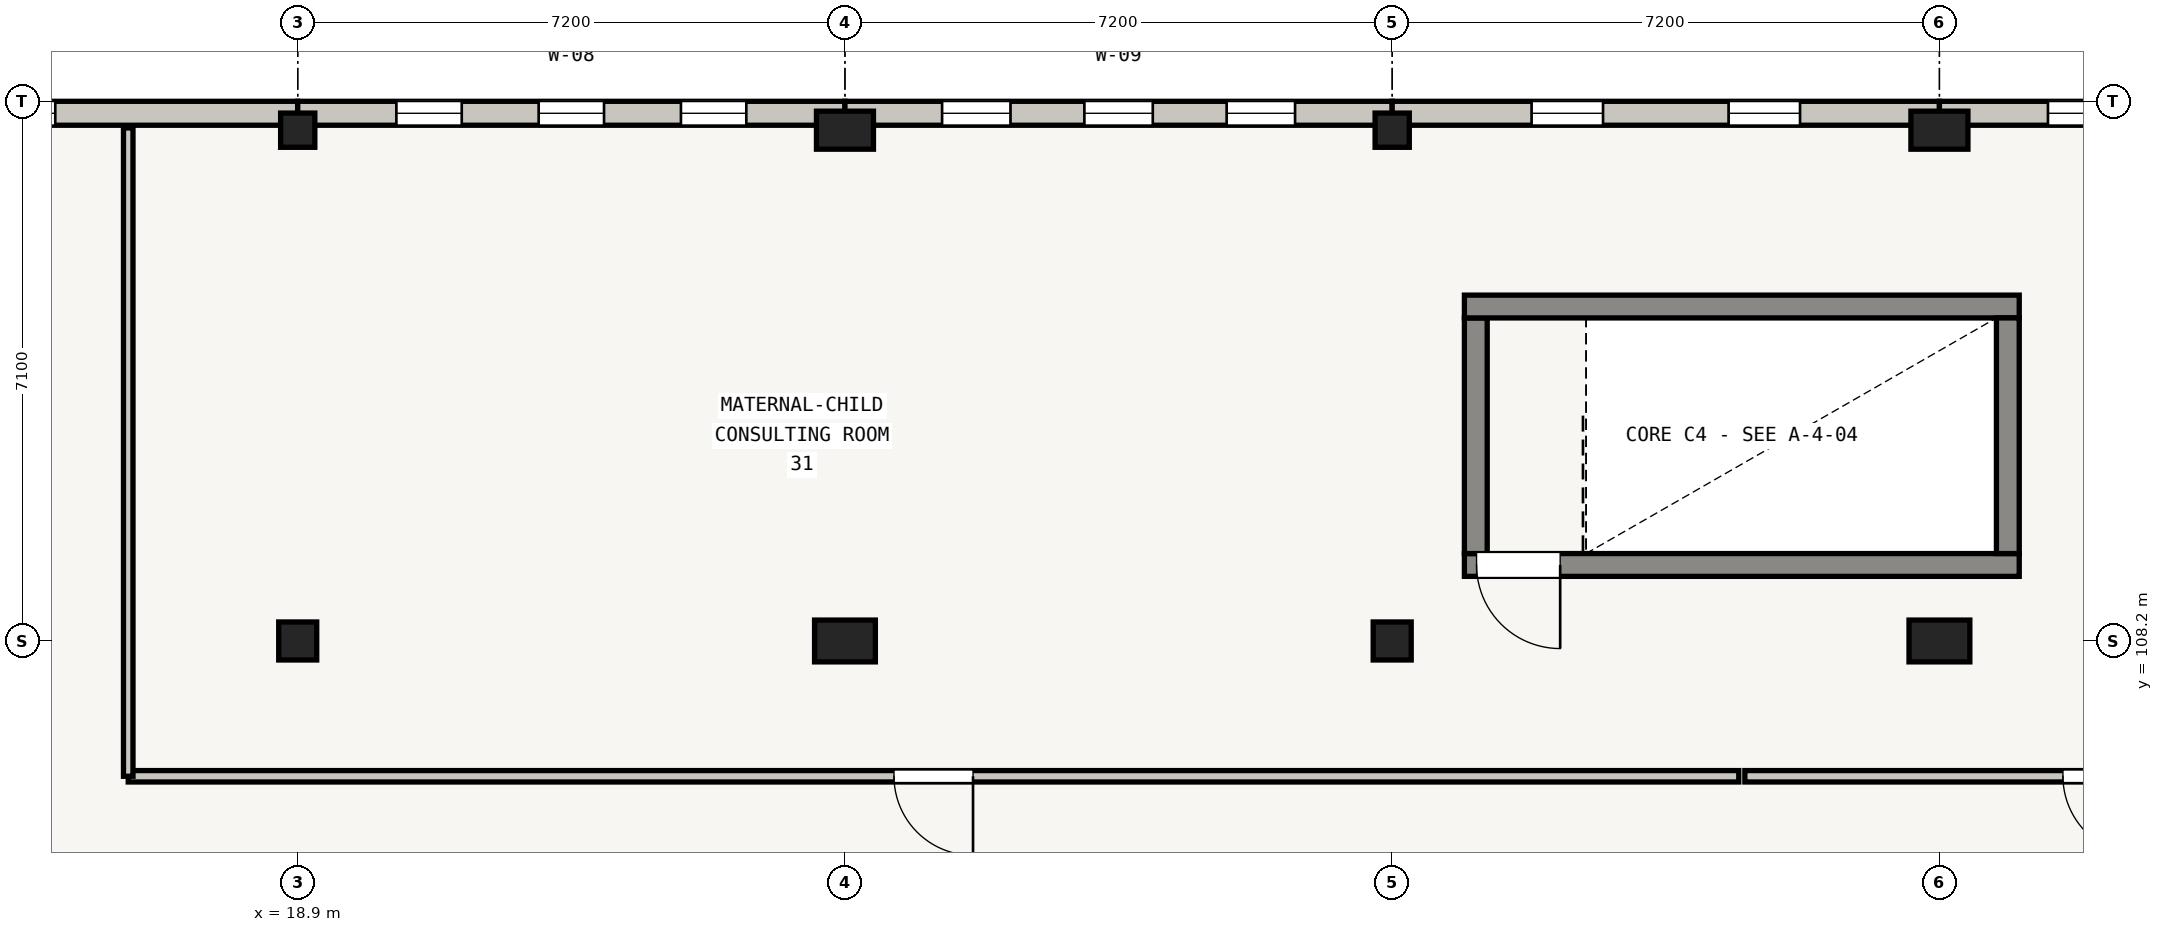
"""IFC4 building model, lengths in metres.
Left out: names, types, materials, properties, quantities, classifications, styles, units other than length and angle.
Written with IfcOpenShell. Run it as: python <this file> out.ifc"""

import sys

from ifc_helpers import new_model, si_unit, direction, frame, frame_2d, origin, origin_2d, place, context, subcontext, project, spatial, rectangle, extrude, element, fill, save


model = new_model("IFC4")
c1 = context("Model", 3, precision=1e-05, world=origin(), true_north=direction((0.0, 1.0)))
c2 = subcontext(c1, "Body", "Model", "MODEL_VIEW")
j1 = project(units=[si_unit("LENGTHUNIT", "METRE"), si_unit("PLANEANGLEUNIT", "RADIAN")], contexts=[c1])
p1 = place(None, origin())
s1 = spatial("IfcSite", under=j1, at=p1, CompositionType="ELEMENT")
p2 = place(p1, origin())
s2 = spatial("IfcBuilding", under=s1, at=p2, CompositionType="ELEMENT")
p3 = place(p2, frame((0.0, 0.0, 12.9)))
s3 = spatial("IfcBuildingStorey", under=s2, at=p3, CompositionType="ELEMENT", Elevation=12.9)
p4 = place(p3, frame((18.9, 108.2, 0.0), z_axis=(0.0, 0.0, 1.0), x_axis=(1.0, 0.0, 0.0)))
e1 = element("IfcColumn", 1, at=p4, inside=s3, PredefinedType="COLUMN", context=c2, shape_type="SweptSolid", body=[
    extrude(rectangle(XDim=0.5, YDim=0.5, at=origin_2d()), origin(), (0.0, 0.0, 1.0), 4.025),
])
p5 = place(p3, frame((18.9, 114.92, 0.0), z_axis=(0.0, 0.0, 1.0), x_axis=(1.0, 0.0, 0.0)))
e2 = element("IfcColumn", 2, at=p5, inside=s3, PredefinedType="COLUMN", context=c2, shape_type="SweptSolid", body=[
    extrude(rectangle(XDim=0.45, YDim=0.45, at=origin_2d()), origin(), (0.0, 0.0, 1.0), 4.025),
])
p6 = place(p3, frame((26.1, 108.2, 0.0), z_axis=(0.0, 0.0, 1.0), x_axis=(1.0, 0.0, 0.0)))
e3 = element("IfcColumn", 3, at=p6, inside=s3, PredefinedType="COLUMN", context=c2, shape_type="SweptSolid", body=[
    extrude(rectangle(XDim=0.8, YDim=0.55, at=origin_2d()), origin(), (0.0, 0.0, 1.0), 4.025),
])
p7 = place(p3, frame((26.1, 114.92, 0.0), z_axis=(0.0, 0.0, 1.0), x_axis=(1.0, 0.0, 0.0)))
e4 = element("IfcColumn", 4, at=p7, inside=s3, PredefinedType="COLUMN", context=c2, shape_type="SweptSolid", body=[
    extrude(rectangle(XDim=0.75, YDim=0.5, at=origin_2d()), origin(), (0.0, 0.0, 1.0), 4.025),
])
p8 = place(p3, frame((33.3, 108.2, 0.0), z_axis=(0.0, 0.0, 1.0), x_axis=(1.0, 0.0, 0.0)))
e5 = element("IfcColumn", 5, at=p8, inside=s3, PredefinedType="COLUMN", context=c2, shape_type="SweptSolid", body=[
    extrude(rectangle(XDim=0.5, YDim=0.5, at=origin_2d()), origin(), (0.0, 0.0, 1.0), 4.025),
])
p9 = place(p3, frame((33.3, 114.92, 0.0), z_axis=(0.0, 0.0, 1.0), x_axis=(1.0, 0.0, 0.0)))
e6 = element("IfcColumn", 6, at=p9, inside=s3, PredefinedType="COLUMN", context=c2, shape_type="SweptSolid", body=[
    extrude(rectangle(XDim=0.45, YDim=0.45, at=origin_2d()), origin(), (0.0, 0.0, 1.0), 4.025),
])
p10 = place(p3, frame((40.5, 108.2, 0.0), z_axis=(0.0, 0.0, 1.0), x_axis=(1.0, 0.0, 0.0)))
e7 = element("IfcColumn", 7, at=p10, inside=s3, PredefinedType="COLUMN", context=c2, shape_type="SweptSolid", body=[
    extrude(rectangle(XDim=0.8, YDim=0.55, at=origin_2d()), origin(), (0.0, 0.0, 1.0), 4.025),
])
p11 = place(p3, frame((40.5, 114.92, 0.0), z_axis=(0.0, 0.0, 1.0), x_axis=(1.0, 0.0, 0.0)))
e8 = element("IfcColumn", 8, at=p11, inside=s3, PredefinedType="COLUMN", context=c2, shape_type="SweptSolid", body=[
    extrude(rectangle(XDim=0.75, YDim=0.5, at=origin_2d()), origin(), (0.0, 0.0, 1.0), 4.025),
])
p12 = place(p3, frame((11.7, 115.143, 0.0), z_axis=(0.0, 0.0, 1.0), x_axis=(1.0, 0.0, 0.0)))
e9 = element("IfcWall", 9, at=p12, inside=s3, PredefinedType="SOLIDWALL", context=c2, shape_type="SweptSolid", body=[
    extrude(rectangle(XDim=7.2, YDim=0.315, at=frame_2d((3.6, 0.0))), origin(), (0.0, 0.0, 1.0), 4.015),
])
p13 = place(p12, frame((3.19, 0.0, 0.55)))
e10 = element("IfcOpeningElement", 10, at=p13, cuts=e9, PredefinedType="OPENING", context=c2, shape_type="SweptSolid", body=[
    extrude(rectangle(XDim=0.82, YDim=2.2, at=frame_2d((0.41, 1.1))), frame((0.0, 0.157, 0.0), z_axis=(0.0, -1.0, 0.0), x_axis=(1.0, 0.0, 0.0)), (0.0, 0.0, 1.0), 0.315),
])
p14 = place(p3, frame((18.9, 115.143, 0.0), z_axis=(0.0, 0.0, 1.0), x_axis=(1.0, 0.0, 0.0)))
e11 = element("IfcWall", 11, at=p14, inside=s3, PredefinedType="SOLIDWALL", context=c2, shape_type="SweptSolid", body=[
    extrude(rectangle(XDim=7.2, YDim=0.315, at=frame_2d((3.6, 0.0))), origin(), (0.0, 0.0, 1.0), 4.015),
])
p15 = place(p14, frame((1.298, 0.0, 0.55)))
e12 = element("IfcOpeningElement", 12, at=p15, cuts=e11, PredefinedType="OPENING", context=c2, shape_type="SweptSolid", body=[
    extrude(rectangle(XDim=0.86, YDim=2.2, at=frame_2d((0.43, 1.1))), frame((0.0, 0.157, 0.0), z_axis=(0.0, -1.0, 0.0), x_axis=(1.0, 0.0, 0.0)), (0.0, 0.0, 1.0), 0.315),
])
p16 = place(p14, frame((3.17, 0.0, 0.55)))
e13 = element("IfcOpeningElement", 13, at=p16, cuts=e11, PredefinedType="OPENING", context=c2, shape_type="SweptSolid", body=[
    extrude(rectangle(XDim=0.86, YDim=2.2, at=frame_2d((0.43, 1.1))), frame((0.0, 0.157, 0.0), z_axis=(0.0, -1.0, 0.0), x_axis=(1.0, 0.0, 0.0)), (0.0, 0.0, 1.0), 0.315),
])
p17 = place(p14, frame((5.042, 0.0, 0.55)))
e14 = element("IfcOpeningElement", 14, at=p17, cuts=e11, PredefinedType="OPENING", context=c2, shape_type="SweptSolid", body=[
    extrude(rectangle(XDim=0.86, YDim=2.2, at=frame_2d((0.43, 1.1))), frame((0.0, 0.157, 0.0), z_axis=(0.0, -1.0, 0.0), x_axis=(1.0, 0.0, 0.0)), (0.0, 0.0, 1.0), 0.315),
])
p18 = place(p3, frame((26.1, 115.143, 0.0), z_axis=(0.0, 0.0, 1.0), x_axis=(1.0, 0.0, 0.0)))
e15 = element("IfcWall", 15, at=p18, inside=s3, PredefinedType="SOLIDWALL", context=c2, shape_type="SweptSolid", body=[
    extrude(rectangle(XDim=7.2, YDim=0.315, at=frame_2d((3.6, 0.0))), origin(), (0.0, 0.0, 1.0), 4.015),
])
p19 = place(p18, frame((1.278, 0.0, 0.55)))
e16 = element("IfcOpeningElement", 16, at=p19, cuts=e15, PredefinedType="OPENING", context=c2, shape_type="SweptSolid", body=[
    extrude(rectangle(XDim=0.9, YDim=2.18, at=frame_2d((0.45, 1.09))), frame((0.0, 0.157, 0.0), z_axis=(0.0, -1.0, 0.0), x_axis=(1.0, 0.0, 0.0)), (0.0, 0.0, 1.0), 0.315),
])
p20 = place(p18, frame((3.15, 0.0, 0.55)))
e17 = element("IfcOpeningElement", 17, at=p20, cuts=e15, PredefinedType="OPENING", context=c2, shape_type="SweptSolid", body=[
    extrude(rectangle(XDim=0.9, YDim=2.18, at=frame_2d((0.45, 1.09))), frame((0.0, 0.157, 0.0), z_axis=(0.0, -1.0, 0.0), x_axis=(1.0, 0.0, 0.0)), (0.0, 0.0, 1.0), 0.315),
])
p21 = place(p18, frame((5.022, 0.0, 0.55)))
e18 = element("IfcOpeningElement", 18, at=p21, cuts=e15, PredefinedType="OPENING", context=c2, shape_type="SweptSolid", body=[
    extrude(rectangle(XDim=0.9, YDim=2.18, at=frame_2d((0.45, 1.09))), frame((0.0, 0.157, 0.0), z_axis=(0.0, -1.0, 0.0), x_axis=(1.0, 0.0, 0.0)), (0.0, 0.0, 1.0), 0.315),
])
p22 = place(p3, frame((33.3, 115.143, 0.0), z_axis=(0.0, 0.0, 1.0), x_axis=(1.0, 0.0, 0.0)))
e19 = element("IfcWall", 19, at=p22, inside=s3, PredefinedType="SOLIDWALL", context=c2, shape_type="SweptSolid", body=[
    extrude(rectangle(XDim=7.2, YDim=0.315, at=frame_2d((3.6, 0.0))), origin(), (0.0, 0.0, 1.0), 4.015),
])
p23 = place(p22, frame((1.834, 0.0, 0.55)))
e20 = element("IfcOpeningElement", 20, at=p23, cuts=e19, PredefinedType="OPENING", context=c2, shape_type="SweptSolid", body=[
    extrude(rectangle(XDim=0.94, YDim=2.18, at=frame_2d((0.47, 1.09))), frame((0.0, 0.157, 0.0), z_axis=(0.0, -1.0, 0.0), x_axis=(1.0, 0.0, 0.0)), (0.0, 0.0, 1.0), 0.315),
])
p24 = place(p22, frame((4.426, 0.0, 0.55)))
e21 = element("IfcOpeningElement", 21, at=p24, cuts=e19, PredefinedType="OPENING", context=c2, shape_type="SweptSolid", body=[
    extrude(rectangle(XDim=0.94, YDim=2.18, at=frame_2d((0.47, 1.09))), frame((0.0, 0.157, 0.0), z_axis=(0.0, -1.0, 0.0), x_axis=(1.0, 0.0, 0.0)), (0.0, 0.0, 1.0), 0.315),
])
p25 = place(p3, frame((40.5, 115.143, 0.0), z_axis=(0.0, 0.0, 1.0), x_axis=(1.0, 0.0, 0.0)))
e22 = element("IfcWall", 22, at=p25, inside=s3, PredefinedType="SOLIDWALL", context=c2, shape_type="SweptSolid", body=[
    extrude(rectangle(XDim=7.2, YDim=0.315, at=frame_2d((3.6, 0.0))), origin(), (0.0, 0.0, 1.0), 4.015),
])
p26 = place(p25, frame((1.428, 0.0, 0.55)))
e23 = element("IfcOpeningElement", 23, at=p26, cuts=e22, PredefinedType="OPENING", context=c2, shape_type="SweptSolid", body=[
    extrude(rectangle(XDim=0.6, YDim=2.28, at=frame_2d((0.3, 1.14))), frame((0.0, 0.157, 0.0), z_axis=(0.0, -1.0, 0.0), x_axis=(1.0, 0.0, 0.0)), (0.0, 0.0, 1.0), 0.315),
])
p27 = place(p25, frame((3.3, 0.0, 0.55)))
e24 = element("IfcOpeningElement", 24, at=p27, cuts=e22, PredefinedType="OPENING", context=c2, shape_type="SweptSolid", body=[
    extrude(rectangle(XDim=0.6, YDim=2.28, at=frame_2d((0.3, 1.14))), frame((0.0, 0.157, 0.0), z_axis=(0.0, -1.0, 0.0), x_axis=(1.0, 0.0, 0.0)), (0.0, 0.0, 1.0), 0.315),
])
p28 = place(p25, frame((5.172, 0.0, 0.55)))
e25 = element("IfcOpeningElement", 25, at=p28, cuts=e22, PredefinedType="OPENING", context=c2, shape_type="SweptSolid", body=[
    extrude(rectangle(XDim=0.6, YDim=2.28, at=frame_2d((0.3, 1.14))), frame((0.0, 0.157, 0.0), z_axis=(0.0, -1.0, 0.0), x_axis=(1.0, 0.0, 0.0)), (0.0, 0.0, 1.0), 0.315),
])
p29 = place(p3, frame((41.55, 109.2, 0.0), z_axis=(0.0, 0.0, 1.0), x_axis=(-1.0, 0.0, 0.0)))
e26 = element("IfcWall", 26, at=p29, inside=s3, PredefinedType="SHEAR", context=c2, shape_type="SweptSolid", body=[
    extrude(rectangle(XDim=7.3, YDim=0.3, at=frame_2d((3.65, 0.0))), origin(), (0.0, 0.0, 1.0), 3.935),
])
p30 = place(p29, frame((6.04, 0.0, 0.0)))
e27 = element("IfcOpeningElement", 27, at=p30, cuts=e26, PredefinedType="OPENING", context=c2, shape_type="SweptSolid", body=[
    extrude(rectangle(XDim=1.1, YDim=2.05, at=frame_2d((0.55, 1.025))), frame((0.0, 0.15, 0.0), z_axis=(0.0, -1.0, 0.0), x_axis=(1.0, 0.0, 0.0)), (0.0, 0.0, 1.0), 0.3),
])
p31 = place(p3, frame((34.4, 109.35, 0.0), z_axis=(0.0, 0.0, 1.0), x_axis=(0.0, 1.0, 0.0)))
e28 = element("IfcWall", 28, at=p31, inside=s3, PredefinedType="SHEAR", context=c2, shape_type="SweptSolid", body=[
    extrude(rectangle(XDim=3.1, YDim=0.3, at=frame_2d((1.55, 0.0))), origin(), (0.0, 0.0, 1.0), 3.935),
])
p32 = place(p3, frame((34.25, 112.6, 0.0), z_axis=(0.0, 0.0, 1.0), x_axis=(1.0, 0.0, 0.0)))
e29 = element("IfcWall", 29, at=p32, inside=s3, PredefinedType="SHEAR", context=c2, shape_type="SweptSolid", body=[
    extrude(rectangle(XDim=7.3, YDim=0.3, at=frame_2d((3.65, 0.0))), origin(), (0.0, 0.0, 1.0), 3.935),
])
p33 = place(p3, frame((41.4, 112.45, 0.0), z_axis=(0.0, 0.0, 1.0), x_axis=(0.0, -1.0, 0.0)))
e30 = element("IfcWall", 30, at=p33, inside=s3, PredefinedType="SHEAR", context=c2, shape_type="SweptSolid", body=[
    extrude(rectangle(XDim=3.1, YDim=0.3, at=frame_2d((1.55, 0.0))), origin(), (0.0, 0.0, 1.0), 3.935),
])
p34 = place(p3, frame((37.86, 106.42, 0.0), z_axis=(0.0, 0.0, 1.0), x_axis=(-1.0, 0.0, 0.0)))
e31 = element("IfcWall", 31, at=p34, inside=s3, PredefinedType="PARTITIONING", context=c2, shape_type="SweptSolid", body=[
    extrude(rectangle(XDim=21.19, YDim=0.15, at=frame_2d((10.595, 0.0))), origin(), (0.0, 0.0, 1.0), 2.955),
])
p35 = place(p34, frame((10.075, 0.0, 0.0)))
e32 = element("IfcOpeningElement", 32, at=p35, cuts=e31, PredefinedType="OPENING", context=c2, shape_type="SweptSolid", body=[
    extrude(rectangle(XDim=1.04, YDim=2.05, at=frame_2d((0.52, 1.025))), frame((0.0, 0.075, 0.0), z_axis=(0.0, -1.0, 0.0), x_axis=(1.0, 0.0, 0.0)), (0.0, 0.0, 1.0), 0.15),
])
p36 = place(p3, frame((16.67, 106.42, 0.0), z_axis=(0.0, 0.0, 1.0), x_axis=(0.0, 1.0, 0.0)))
e33 = element("IfcWall", 33, at=p36, inside=s3, PredefinedType="PARTITIONING", context=c2, shape_type="SweptSolid", body=[
    extrude(rectangle(XDim=8.53, YDim=0.125, at=frame_2d((4.265, 0.0))), origin(), (0.0, 0.0, 1.0), 2.955),
])
p37 = place(p3, frame((47.35, 106.42, 0.0), z_axis=(0.0, 0.0, 1.0), x_axis=(-1.0, 0.0, 0.0)))
e34 = element("IfcWall", 34, at=p37, inside=s3, PredefinedType="PARTITIONING", context=c2, shape_type="SweptSolid", body=[
    extrude(rectangle(XDim=9.41, YDim=0.15, at=frame_2d((4.705, 0.0))), origin(), (0.0, 0.0, 1.0), 2.955),
])
p38 = place(p37, frame((4.185, 0.0, 0.0)))
e35 = element("IfcOpeningElement", 35, at=p38, cuts=e34, PredefinedType="OPENING", context=c2, shape_type="SweptSolid", body=[
    extrude(rectangle(XDim=1.04, YDim=2.05, at=frame_2d((0.52, 1.025))), frame((0.0, 0.075, 0.0), z_axis=(0.0, -1.0, 0.0), x_axis=(1.0, 0.0, 0.0)), (0.0, 0.0, 1.0), 0.15),
])
p39 = place(p13, origin())
e36 = element("IfcWindow", 36, at=p39, inside=s3, PartitioningType="SINGLE_PANEL", PredefinedType="WINDOW", context=c2, shape_type="SweptSolid", body=[
    extrude(rectangle(XDim=0.82, YDim=2.2, at=frame_2d((0.41, 1.1))), frame((0.0, 0.03, 0.0), z_axis=(0.0, -1.0, 0.0), x_axis=(1.0, 0.0, 0.0)), (0.0, 0.0, 1.0), 0.06),
])
fill(e10, e36)
p40 = place(p15, origin())
e37 = element("IfcWindow", 37, at=p40, inside=s3, PartitioningType="SINGLE_PANEL", PredefinedType="WINDOW", context=c2, shape_type="SweptSolid", body=[
    extrude(rectangle(XDim=0.86, YDim=2.2, at=frame_2d((0.43, 1.1))), frame((0.0, 0.03, 0.0), z_axis=(0.0, -1.0, 0.0), x_axis=(1.0, 0.0, 0.0)), (0.0, 0.0, 1.0), 0.06),
])
fill(e12, e37)
p41 = place(p16, origin())
e38 = element("IfcWindow", 38, at=p41, inside=s3, PartitioningType="SINGLE_PANEL", PredefinedType="WINDOW", context=c2, shape_type="SweptSolid", body=[
    extrude(rectangle(XDim=0.86, YDim=2.2, at=frame_2d((0.43, 1.1))), frame((0.0, 0.03, 0.0), z_axis=(0.0, -1.0, 0.0), x_axis=(1.0, 0.0, 0.0)), (0.0, 0.0, 1.0), 0.06),
])
fill(e13, e38)
p42 = place(p17, origin())
e39 = element("IfcWindow", 39, at=p42, inside=s3, PartitioningType="SINGLE_PANEL", PredefinedType="WINDOW", context=c2, shape_type="SweptSolid", body=[
    extrude(rectangle(XDim=0.86, YDim=2.2, at=frame_2d((0.43, 1.1))), frame((0.0, 0.03, 0.0), z_axis=(0.0, -1.0, 0.0), x_axis=(1.0, 0.0, 0.0)), (0.0, 0.0, 1.0), 0.06),
])
fill(e14, e39)
p43 = place(p19, origin())
e40 = element("IfcWindow", 40, at=p43, inside=s3, PartitioningType="DOUBLE_PANEL_VERTICAL", PredefinedType="WINDOW", context=c2, shape_type="SweptSolid", body=[
    extrude(rectangle(XDim=0.9, YDim=2.18, at=frame_2d((0.45, 1.09))), frame((0.0, 0.03, 0.0), z_axis=(0.0, -1.0, 0.0), x_axis=(1.0, 0.0, 0.0)), (0.0, 0.0, 1.0), 0.06),
])
fill(e16, e40)
p44 = place(p20, origin())
e41 = element("IfcWindow", 41, at=p44, inside=s3, PartitioningType="DOUBLE_PANEL_VERTICAL", PredefinedType="WINDOW", context=c2, shape_type="SweptSolid", body=[
    extrude(rectangle(XDim=0.9, YDim=2.18, at=frame_2d((0.45, 1.09))), frame((0.0, 0.03, 0.0), z_axis=(0.0, -1.0, 0.0), x_axis=(1.0, 0.0, 0.0)), (0.0, 0.0, 1.0), 0.06),
])
fill(e17, e41)
p45 = place(p21, origin())
e42 = element("IfcWindow", 42, at=p45, inside=s3, PartitioningType="DOUBLE_PANEL_VERTICAL", PredefinedType="WINDOW", context=c2, shape_type="SweptSolid", body=[
    extrude(rectangle(XDim=0.9, YDim=2.18, at=frame_2d((0.45, 1.09))), frame((0.0, 0.03, 0.0), z_axis=(0.0, -1.0, 0.0), x_axis=(1.0, 0.0, 0.0)), (0.0, 0.0, 1.0), 0.06),
])
fill(e18, e42)
p46 = place(p23, origin())
e43 = element("IfcWindow", 43, at=p46, inside=s3, PartitioningType="DOUBLE_PANEL_VERTICAL", PredefinedType="WINDOW", context=c2, shape_type="SweptSolid", body=[
    extrude(rectangle(XDim=0.94, YDim=2.18, at=frame_2d((0.47, 1.09))), frame((0.0, 0.03, 0.0), z_axis=(0.0, -1.0, 0.0), x_axis=(1.0, 0.0, 0.0)), (0.0, 0.0, 1.0), 0.06),
])
fill(e20, e43)
p47 = place(p24, origin())
e44 = element("IfcWindow", 44, at=p47, inside=s3, PartitioningType="DOUBLE_PANEL_VERTICAL", PredefinedType="WINDOW", context=c2, shape_type="SweptSolid", body=[
    extrude(rectangle(XDim=0.94, YDim=2.18, at=frame_2d((0.47, 1.09))), frame((0.0, 0.03, 0.0), z_axis=(0.0, -1.0, 0.0), x_axis=(1.0, 0.0, 0.0)), (0.0, 0.0, 1.0), 0.06),
])
fill(e21, e44)
p48 = place(p26, origin())
e45 = element("IfcWindow", 45, at=p48, inside=s3, PartitioningType="SINGLE_PANEL", PredefinedType="WINDOW", context=c2, shape_type="SweptSolid", body=[
    extrude(rectangle(XDim=0.6, YDim=2.28, at=frame_2d((0.3, 1.14))), frame((0.0, 0.03, 0.0), z_axis=(0.0, -1.0, 0.0), x_axis=(1.0, 0.0, 0.0)), (0.0, 0.0, 1.0), 0.06),
])
fill(e23, e45)
p49 = place(p30, origin())
e46 = element("IfcDoor", 46, at=p49, inside=s3, OperationType="SINGLE_SWING_LEFT", PredefinedType="DOOR", context=c2, shape_type="SweptSolid", body=[
    extrude(rectangle(XDim=1.1, YDim=2.05, at=frame_2d((0.55, 1.025))), frame((0.0, 0.025, 0.0), z_axis=(0.0, -1.0, 0.0), x_axis=(1.0, 0.0, 0.0)), (0.0, 0.0, 1.0), 0.05),
])
fill(e27, e46)
p50 = place(p35, origin())
e47 = element("IfcDoor", 47, at=p50, inside=s3, OperationType="SINGLE_SWING_LEFT", PredefinedType="DOOR", context=c2, shape_type="SweptSolid", body=[
    extrude(rectangle(XDim=1.04, YDim=2.05, at=frame_2d((0.52, 1.025))), frame((0.0, 0.025, 0.0), z_axis=(0.0, -1.0, 0.0), x_axis=(1.0, 0.0, 0.0)), (0.0, 0.0, 1.0), 0.05),
])
fill(e32, e47)
p51 = place(p38, origin())
e48 = element("IfcDoor", 48, at=p51, inside=s3, OperationType="SINGLE_SWING_LEFT", PredefinedType="DOOR", context=c2, shape_type="SweptSolid", body=[
    extrude(rectangle(XDim=1.04, YDim=2.05, at=frame_2d((0.52, 1.025))), frame((0.0, 0.025, 0.0), z_axis=(0.0, -1.0, 0.0), x_axis=(1.0, 0.0, 0.0)), (0.0, 0.0, 1.0), 0.05),
])
fill(e35, e48)
save(model, sys.argv[1])
